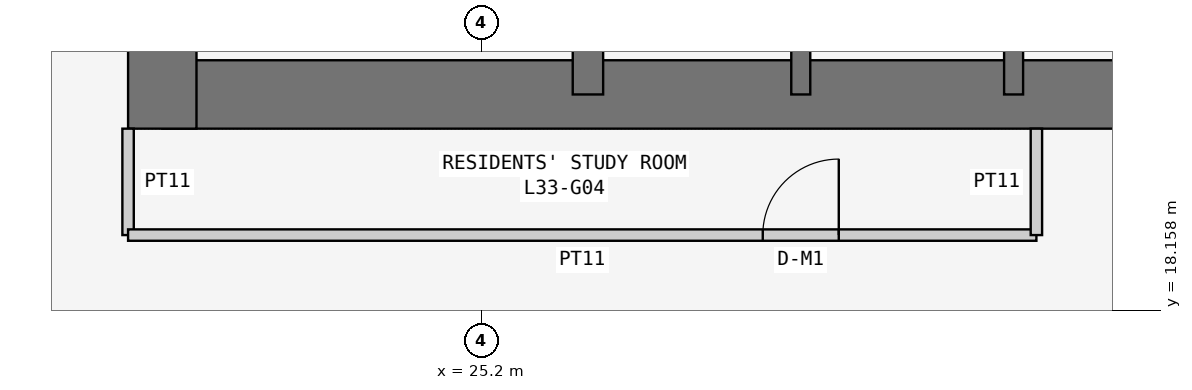
"""IFC4 building model, lengths in metres.
Left out: names, types, materials, properties, quantities, classifications, styles, units other than length and angle.
Written with IfcOpenShell. Run it as: python <this file> out.ifc"""

import sys

from ifc_helpers import new_model, si_unit, direction, frame, frame_2d, origin, place, context, subcontext, project, spatial, rectangle, extrude, element, fill, save


model = new_model("IFC4")
c1 = context("Model", 3, precision=1e-05, world=origin(), true_north=direction((0.0, 1.0)))
c2 = subcontext(c1, "Body", "Model", "MODEL_VIEW")
j1 = project(units=[si_unit("LENGTHUNIT", "METRE"), si_unit("PLANEANGLEUNIT", "RADIAN")], contexts=[c1])
p1 = place(None, origin())
s1 = spatial("IfcSite", under=j1, at=p1, CompositionType="ELEMENT")
p2 = place(p1, origin())
s2 = spatial("IfcBuilding", under=s1, at=p2, CompositionType="ELEMENT")
p3 = place(p2, frame((0.0, 0.0, 130.5)))
s3 = spatial("IfcBuildingStorey", under=s2, at=p3, CompositionType="ELEMENT", Elevation=130.5)
p4 = place(p3, frame((21.0, 21.0, 0.0), z_axis=(0.0, 0.0, 1.0), x_axis=(1.0, 0.0, 0.0)))
e1 = element("IfcWall", 1, at=p4, inside=s3, PredefinedType="SHEAR", context=c2, shape_type="SweptSolid", body=[
    extrude(rectangle(XDim=17.25, YDim=0.9, at=frame_2d((8.625, 0.0))), origin(), (0.0, 0.0, 1.0), 3.6),
])
p5 = place(p3, frame((21.0, 37.8, 0.0), z_axis=(0.0, 0.0, 1.0), x_axis=(0.0, -1.0, 0.0)))
e2 = element("IfcWall", 2, at=p5, inside=s3, PredefinedType="SHEAR", context=c2, shape_type="SweptSolid", body=[
    extrude(rectangle(XDim=17.25, YDim=0.9, at=frame_2d((8.625, 0.0))), origin(), (0.0, 0.0, 1.0), 3.6),
])
p6 = place(p5, frame((5.4, 0.0, 0.0)))
e3 = element("IfcOpeningElement", 3, at=p6, cuts=e2, PredefinedType="OPENING", context=c2, shape_type="SweptSolid", body=[
    extrude(rectangle(XDim=1.2, YDim=2.1, at=frame_2d((0.6, 1.05))), frame((0.0, 0.46, 0.0), z_axis=(0.0, -1.0, 0.0), x_axis=(1.0, 0.0, 0.0)), (0.0, 0.0, 1.0), 0.92),
])
p7 = place(p3, frame((26.6, 21.0, 0.0), z_axis=(0.0, 0.0, 1.0), x_axis=(0.0, 1.0, 0.0)))
e4 = element("IfcWall", 4, at=p7, inside=s3, PredefinedType="SHEAR", context=c2, shape_type="SweptSolid", body=[
    extrude(rectangle(XDim=16.8, YDim=0.4, at=frame_2d((8.4, 0.0))), origin(), (0.0, 0.0, 1.0), 3.6),
])
p8 = place(p7, frame((10.4, 0.0, 0.0)))
e5 = element("IfcOpeningElement", 5, at=p8, cuts=e4, PredefinedType="OPENING", context=c2, shape_type="SweptSolid", body=[
    extrude(rectangle(XDim=1.2, YDim=2.1, at=frame_2d((0.6, 1.05))), frame((0.0, 0.21, 0.0), z_axis=(0.0, -1.0, 0.0), x_axis=(1.0, 0.0, 0.0)), (0.0, 0.0, 1.0), 0.42),
])
for number, where, z_axis, x_axis in (
    (6, (29.4, 21.0, 0.0), (0.0, 0.0, 1.0), (0.0, 1.0, 0.0)),
    (7, (32.2, 21.0, 0.0), (0.0, 0.0, 1.0), (0.0, 1.0, 0.0)),
):
    element("IfcWall", number, at=place(p3, frame(where, z_axis=z_axis, x_axis=x_axis)), inside=s3, PredefinedType="SHEAR", context=c2, shape_type="SweptSolid", body=[
        extrude(rectangle(XDim=3.2, YDim=0.25, at=frame_2d((1.6, 0.0))), origin(), (0.0, 0.0, 1.0), 3.6),
    ])
p9 = place(p3, frame((20.55, 20.55, 0.0), z_axis=(0.0, 0.0, 1.0), x_axis=(0.0, -1.0, 0.0)))
e8 = element("IfcWall", 8, at=p9, inside=s3, PredefinedType="PARTITIONING", context=c2, shape_type="SweptSolid", body=[
    extrude(rectangle(XDim=1.4, YDim=0.15, at=frame_2d((0.7, 0.0))), origin(), (0.0, 0.0, 1.0), 3.45),
])
p10 = place(p3, frame((20.55, 19.15, 0.0), z_axis=(0.0, 0.0, 1.0), x_axis=(1.0, 0.0, 0.0)))
e9 = element("IfcWall", 9, at=p10, inside=s3, PredefinedType="PARTITIONING", context=c2, shape_type="SweptSolid", body=[
    extrude(rectangle(XDim=11.95, YDim=0.15, at=frame_2d((5.975, 0.0))), origin(), (0.0, 0.0, 1.0), 3.45),
])
p11 = place(p10, frame((8.35, 0.0, 0.0)))
e10 = element("IfcOpeningElement", 10, at=p11, cuts=e9, PredefinedType="OPENING", context=c2, shape_type="SweptSolid", body=[
    extrude(rectangle(XDim=1.0, YDim=2.1, at=frame_2d((0.5, 1.05))), frame((0.0, 0.085, 0.0), z_axis=(0.0, -1.0, 0.0), x_axis=(1.0, 0.0, 0.0)), (0.0, 0.0, 1.0), 0.17),
])
p12 = place(p3, frame((32.5, 19.15, 0.0), z_axis=(0.0, 0.0, 1.0), x_axis=(0.0, 1.0, 0.0)))
e11 = element("IfcWall", 11, at=p12, inside=s3, PredefinedType="PARTITIONING", context=c2, shape_type="SweptSolid", body=[
    extrude(rectangle(XDim=1.4, YDim=0.15, at=frame_2d((0.7, 0.0))), origin(), (0.0, 0.0, 1.0), 3.45),
])
p13 = place(p11, origin())
e12 = element("IfcDoor", 12, at=p13, inside=s3, OperationType="SINGLE_SWING_RIGHT", PredefinedType="DOOR", context=c2, shape_type="SweptSolid", body=[
    extrude(rectangle(XDim=1.0, YDim=2.1, at=frame_2d((0.5, 1.05))), frame((0.0, 0.025, 0.0), z_axis=(0.0, -1.0, 0.0), x_axis=(1.0, 0.0, 0.0)), (0.0, 0.0, 1.0), 0.05),
])
fill(e10, e12)
save(model, sys.argv[1])
